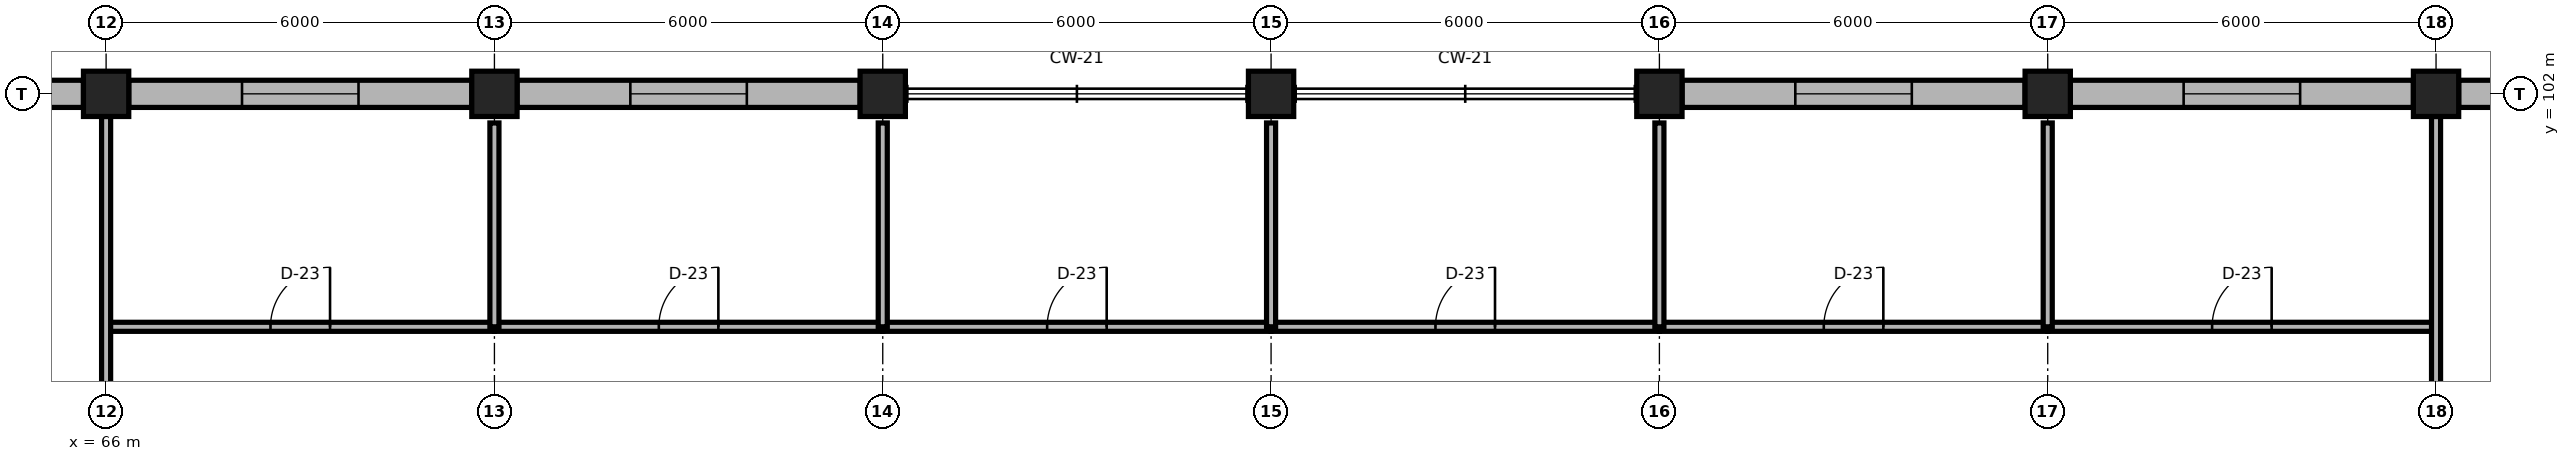
"""IFC4 building model, lengths in metres.
Left out: names, types, materials, properties, quantities, classifications, styles, units other than length and angle.
Written with IfcOpenShell. Run it as: python <this file> out.ifc"""

import sys

from ifc_helpers import new_model, si_unit, direction, frame, frame_2d, origin, origin_2d, place, context, subcontext, project, spatial, rectangle, extrude, element, fill, save


model = new_model("IFC4")
c1 = context("Model", 3, precision=1e-05, world=origin(), true_north=direction((0.0, 1.0)))
c2 = subcontext(c1, "Body", "Model", "MODEL_VIEW")
j1 = project(units=[si_unit("LENGTHUNIT", "METRE"), si_unit("PLANEANGLEUNIT", "RADIAN")], contexts=[c1])
p1 = place(None, origin())
s1 = spatial("IfcSite", under=j1, at=p1, CompositionType="ELEMENT")
p2 = place(p1, origin())
s2 = spatial("IfcBuilding", under=s1, at=p2, CompositionType="ELEMENT")
p3 = place(p2, frame((0.0, 0.0, 60.0)))
s3 = spatial("IfcBuildingStorey", under=s2, at=p3, CompositionType="ELEMENT", Elevation=60.0)
for number, where, z_axis, x_axis in (
    (1, (66.0, 102.0, 0.0), (0.0, 0.0, 1.0), (1.0, 0.0, 0.0)),
    (2, (72.0, 102.0, 0.0), (0.0, 0.0, 1.0), (1.0, 0.0, 0.0)),
    (3, (78.0, 102.0, 0.0), (0.0, 0.0, 1.0), (1.0, 0.0, 0.0)),
    (4, (84.0, 102.0, 0.0), (0.0, 0.0, 1.0), (1.0, 0.0, 0.0)),
    (5, (90.0, 102.0, 0.0), (0.0, 0.0, 1.0), (1.0, 0.0, 0.0)),
    (6, (96.0, 102.0, 0.0), (0.0, 0.0, 1.0), (1.0, 0.0, 0.0)),
    (7, (102.0, 102.0, 0.0), (0.0, 0.0, 1.0), (1.0, 0.0, 0.0)),
):
    element("IfcColumn", number, at=place(p3, frame(where, z_axis=z_axis, x_axis=x_axis)), inside=s3, PredefinedType="COLUMN", context=c2, shape_type="SweptSolid", body=[
        extrude(rectangle(XDim=0.7, YDim=0.7, at=origin_2d()), origin(), (0.0, 0.0, 1.0), 3.9),
    ])
p4 = place(p3, frame((60.35, 102.0, 0.0), z_axis=(0.0, 0.0, 1.0), x_axis=(1.0, 0.0, 0.0)))
e8 = element("IfcWall", 8, at=p4, inside=s3, PredefinedType="SOLIDWALL", context=c2, shape_type="SweptSolid", body=[
    extrude(rectangle(XDim=5.3, YDim=0.42, at=frame_2d((2.65, 0.0))), origin(), (0.0, 0.0, 1.0), 3.32),
])
p5 = place(p4, frame((1.75, 0.0, 0.85)))
e9 = element("IfcOpeningElement", 9, at=p5, cuts=e8, PredefinedType="OPENING", context=c2, shape_type="SweptSolid", body=[
    extrude(rectangle(XDim=1.8, YDim=1.95, at=frame_2d((0.9, 0.975))), frame((0.0, 0.225, 0.0), z_axis=(0.0, -1.0, 0.0), x_axis=(1.0, 0.0, 0.0)), (0.0, 0.0, 1.0), 0.45),
])
p6 = place(p3, frame((66.35, 102.0, 0.0), z_axis=(0.0, 0.0, 1.0), x_axis=(1.0, 0.0, 0.0)))
e10 = element("IfcWall", 10, at=p6, inside=s3, PredefinedType="SOLIDWALL", context=c2, shape_type="SweptSolid", body=[
    extrude(rectangle(XDim=5.3, YDim=0.42, at=frame_2d((2.65, 0.0))), origin(), (0.0, 0.0, 1.0), 3.32),
])
p7 = place(p6, frame((1.75, 0.0, 0.85)))
e11 = element("IfcOpeningElement", 11, at=p7, cuts=e10, PredefinedType="OPENING", context=c2, shape_type="SweptSolid", body=[
    extrude(rectangle(XDim=1.8, YDim=1.95, at=frame_2d((0.9, 0.975))), frame((0.0, 0.225, 0.0), z_axis=(0.0, -1.0, 0.0), x_axis=(1.0, 0.0, 0.0)), (0.0, 0.0, 1.0), 0.45),
])
p8 = place(p3, frame((72.35, 102.0, 0.0), z_axis=(0.0, 0.0, 1.0), x_axis=(1.0, 0.0, 0.0)))
e12 = element("IfcWall", 12, at=p8, inside=s3, PredefinedType="SOLIDWALL", context=c2, shape_type="SweptSolid", body=[
    extrude(rectangle(XDim=5.3, YDim=0.42, at=frame_2d((2.65, 0.0))), origin(), (0.0, 0.0, 1.0), 3.32),
])
p9 = place(p8, frame((1.75, 0.0, 0.85)))
e13 = element("IfcOpeningElement", 13, at=p9, cuts=e12, PredefinedType="OPENING", context=c2, shape_type="SweptSolid", body=[
    extrude(rectangle(XDim=1.8, YDim=1.95, at=frame_2d((0.9, 0.975))), frame((0.0, 0.225, 0.0), z_axis=(0.0, -1.0, 0.0), x_axis=(1.0, 0.0, 0.0)), (0.0, 0.0, 1.0), 0.45),
])
p10 = place(p3, frame((90.35, 102.0, 0.0), z_axis=(0.0, 0.0, 1.0), x_axis=(1.0, 0.0, 0.0)))
e14 = element("IfcWall", 14, at=p10, inside=s3, PredefinedType="SOLIDWALL", context=c2, shape_type="SweptSolid", body=[
    extrude(rectangle(XDim=5.3, YDim=0.42, at=frame_2d((2.65, 0.0))), origin(), (0.0, 0.0, 1.0), 3.32),
])
p11 = place(p10, frame((1.75, 0.0, 0.85)))
e15 = element("IfcOpeningElement", 15, at=p11, cuts=e14, PredefinedType="OPENING", context=c2, shape_type="SweptSolid", body=[
    extrude(rectangle(XDim=1.8, YDim=1.95, at=frame_2d((0.9, 0.975))), frame((0.0, 0.225, 0.0), z_axis=(0.0, -1.0, 0.0), x_axis=(1.0, 0.0, 0.0)), (0.0, 0.0, 1.0), 0.45),
])
p12 = place(p3, frame((96.35, 102.0, 0.0), z_axis=(0.0, 0.0, 1.0), x_axis=(1.0, 0.0, 0.0)))
e16 = element("IfcWall", 16, at=p12, inside=s3, PredefinedType="SOLIDWALL", context=c2, shape_type="SweptSolid", body=[
    extrude(rectangle(XDim=5.3, YDim=0.42, at=frame_2d((2.65, 0.0))), origin(), (0.0, 0.0, 1.0), 3.32),
])
p13 = place(p12, frame((1.75, 0.0, 0.85)))
e17 = element("IfcOpeningElement", 17, at=p13, cuts=e16, PredefinedType="OPENING", context=c2, shape_type="SweptSolid", body=[
    extrude(rectangle(XDim=1.8, YDim=1.95, at=frame_2d((0.9, 0.975))), frame((0.0, 0.225, 0.0), z_axis=(0.0, -1.0, 0.0), x_axis=(1.0, 0.0, 0.0)), (0.0, 0.0, 1.0), 0.45),
])
p14 = place(p3, frame((102.35, 102.0, 0.0), z_axis=(0.0, 0.0, 1.0), x_axis=(1.0, 0.0, 0.0)))
e18 = element("IfcWall", 18, at=p14, inside=s3, PredefinedType="SOLIDWALL", context=c2, shape_type="SweptSolid", body=[
    extrude(rectangle(XDim=5.3, YDim=0.42, at=frame_2d((2.65, 0.0))), origin(), (0.0, 0.0, 1.0), 3.32),
])
p15 = place(p14, frame((1.75, 0.0, 0.85)))
e19 = element("IfcOpeningElement", 19, at=p15, cuts=e18, PredefinedType="OPENING", context=c2, shape_type="SweptSolid", body=[
    extrude(rectangle(XDim=1.8, YDim=1.95, at=frame_2d((0.9, 0.975))), frame((0.0, 0.225, 0.0), z_axis=(0.0, -1.0, 0.0), x_axis=(1.0, 0.0, 0.0)), (0.0, 0.0, 1.0), 0.45),
])
p16 = place(p3, frame((66.0, 98.4, 0.0), z_axis=(0.0, 0.0, 1.0), x_axis=(1.0, 0.0, 0.0)))
e20 = element("IfcWall", 20, at=p16, inside=s3, PredefinedType="PARTITIONING", context=c2, shape_type="SweptSolid", body=[
    extrude(rectangle(XDim=6.0, YDim=0.14, at=frame_2d((3.0, 0.0))), origin(), (0.0, 0.0, 1.0), 3.74),
])
p17 = place(p16, frame((2.54, 0.0, 0.0)))
e21 = element("IfcOpeningElement", 21, at=p17, cuts=e20, PredefinedType="OPENING", context=c2, shape_type="SweptSolid", body=[
    extrude(rectangle(XDim=0.92, YDim=2.15, at=frame_2d((0.46, 1.075))), frame((0.0, 0.085, 0.0), z_axis=(0.0, -1.0, 0.0), x_axis=(1.0, 0.0, 0.0)), (0.0, 0.0, 1.0), 0.17),
])
p18 = place(p3, frame((72.0, 98.4, 0.0), z_axis=(0.0, 0.0, 1.0), x_axis=(1.0, 0.0, 0.0)))
e22 = element("IfcWall", 22, at=p18, inside=s3, PredefinedType="PARTITIONING", context=c2, shape_type="SweptSolid", body=[
    extrude(rectangle(XDim=6.0, YDim=0.14, at=frame_2d((3.0, 0.0))), origin(), (0.0, 0.0, 1.0), 3.74),
])
p19 = place(p18, frame((2.54, 0.0, 0.0)))
e23 = element("IfcOpeningElement", 23, at=p19, cuts=e22, PredefinedType="OPENING", context=c2, shape_type="SweptSolid", body=[
    extrude(rectangle(XDim=0.92, YDim=2.15, at=frame_2d((0.46, 1.075))), frame((0.0, 0.085, 0.0), z_axis=(0.0, -1.0, 0.0), x_axis=(1.0, 0.0, 0.0)), (0.0, 0.0, 1.0), 0.17),
])
p20 = place(p3, frame((78.0, 98.4, 0.0), z_axis=(0.0, 0.0, 1.0), x_axis=(1.0, 0.0, 0.0)))
e24 = element("IfcWall", 24, at=p20, inside=s3, PredefinedType="PARTITIONING", context=c2, shape_type="SweptSolid", body=[
    extrude(rectangle(XDim=6.0, YDim=0.14, at=frame_2d((3.0, 0.0))), origin(), (0.0, 0.0, 1.0), 3.74),
])
p21 = place(p20, frame((2.54, 0.0, 0.0)))
e25 = element("IfcOpeningElement", 25, at=p21, cuts=e24, PredefinedType="OPENING", context=c2, shape_type="SweptSolid", body=[
    extrude(rectangle(XDim=0.92, YDim=2.15, at=frame_2d((0.46, 1.075))), frame((0.0, 0.085, 0.0), z_axis=(0.0, -1.0, 0.0), x_axis=(1.0, 0.0, 0.0)), (0.0, 0.0, 1.0), 0.17),
])
p22 = place(p3, frame((84.0, 98.4, 0.0), z_axis=(0.0, 0.0, 1.0), x_axis=(1.0, 0.0, 0.0)))
e26 = element("IfcWall", 26, at=p22, inside=s3, PredefinedType="PARTITIONING", context=c2, shape_type="SweptSolid", body=[
    extrude(rectangle(XDim=6.0, YDim=0.14, at=frame_2d((3.0, 0.0))), origin(), (0.0, 0.0, 1.0), 3.74),
])
p23 = place(p22, frame((2.54, 0.0, 0.0)))
e27 = element("IfcOpeningElement", 27, at=p23, cuts=e26, PredefinedType="OPENING", context=c2, shape_type="SweptSolid", body=[
    extrude(rectangle(XDim=0.92, YDim=2.15, at=frame_2d((0.46, 1.075))), frame((0.0, 0.085, 0.0), z_axis=(0.0, -1.0, 0.0), x_axis=(1.0, 0.0, 0.0)), (0.0, 0.0, 1.0), 0.17),
])
p24 = place(p3, frame((90.0, 98.4, 0.0), z_axis=(0.0, 0.0, 1.0), x_axis=(1.0, 0.0, 0.0)))
e28 = element("IfcWall", 28, at=p24, inside=s3, PredefinedType="PARTITIONING", context=c2, shape_type="SweptSolid", body=[
    extrude(rectangle(XDim=6.0, YDim=0.14, at=frame_2d((3.0, 0.0))), origin(), (0.0, 0.0, 1.0), 3.74),
])
p25 = place(p24, frame((2.54, 0.0, 0.0)))
e29 = element("IfcOpeningElement", 29, at=p25, cuts=e28, PredefinedType="OPENING", context=c2, shape_type="SweptSolid", body=[
    extrude(rectangle(XDim=0.92, YDim=2.15, at=frame_2d((0.46, 1.075))), frame((0.0, 0.085, 0.0), z_axis=(0.0, -1.0, 0.0), x_axis=(1.0, 0.0, 0.0)), (0.0, 0.0, 1.0), 0.17),
])
p26 = place(p3, frame((96.0, 98.4, 0.0), z_axis=(0.0, 0.0, 1.0), x_axis=(1.0, 0.0, 0.0)))
e30 = element("IfcWall", 30, at=p26, inside=s3, PredefinedType="PARTITIONING", context=c2, shape_type="SweptSolid", body=[
    extrude(rectangle(XDim=6.0, YDim=0.14, at=frame_2d((3.0, 0.0))), origin(), (0.0, 0.0, 1.0), 3.74),
])
p27 = place(p26, frame((2.54, 0.0, 0.0)))
e31 = element("IfcOpeningElement", 31, at=p27, cuts=e30, PredefinedType="OPENING", context=c2, shape_type="SweptSolid", body=[
    extrude(rectangle(XDim=0.92, YDim=2.15, at=frame_2d((0.46, 1.075))), frame((0.0, 0.085, 0.0), z_axis=(0.0, -1.0, 0.0), x_axis=(1.0, 0.0, 0.0)), (0.0, 0.0, 1.0), 0.17),
])
for number, where, z_axis, x_axis in (
    (32, (72.0, 98.4, 0.0), (0.0, 0.0, 1.0), (0.0, 1.0, 0.0)),
    (33, (78.0, 98.4, 0.0), (0.0, 0.0, 1.0), (0.0, 1.0, 0.0)),
    (34, (84.0, 98.4, 0.0), (0.0, 0.0, 1.0), (0.0, 1.0, 0.0)),
    (35, (90.0, 98.4, 0.0), (0.0, 0.0, 1.0), (0.0, 1.0, 0.0)),
    (36, (96.0, 98.4, 0.0), (0.0, 0.0, 1.0), (0.0, 1.0, 0.0)),
):
    element("IfcWall", number, at=place(p3, frame(where, z_axis=z_axis, x_axis=x_axis)), inside=s3, PredefinedType="PARTITIONING", context=c2, shape_type="SweptSolid", body=[
        extrude(rectangle(XDim=3.15, YDim=0.14, at=frame_2d((1.575, 0.0))), origin(), (0.0, 0.0, 1.0), 3.449),
    ])
for number, where, z_axis, x_axis in (
    (37, (66.0, 96.35, 0.0), (0.0, 0.0, 1.0), (0.0, 1.0, 0.0)),
    (38, (102.0, 96.35, 0.0), (0.0, 0.0, 1.0), (0.0, 1.0, 0.0)),
):
    element("IfcWall", number, at=place(p3, frame(where, z_axis=z_axis, x_axis=x_axis)), inside=s3, PredefinedType="PARTITIONING", context=c2, shape_type="SweptSolid", body=[
        extrude(rectangle(XDim=5.3, YDim=0.14, at=frame_2d((2.65, 0.0))), origin(), (0.0, 0.0, 1.0), 3.449),
    ])
p28 = place(p7, origin())
e39 = element("IfcWindow", 39, at=p28, inside=s3, PartitioningType="SINGLE_PANEL", PredefinedType="WINDOW", context=c2, shape_type="SweptSolid", body=[
    extrude(rectangle(XDim=1.8, YDim=1.95, at=frame_2d((0.9, 0.975))), frame((0.0, 0.03, 0.0), z_axis=(0.0, -1.0, 0.0), x_axis=(1.0, 0.0, 0.0)), (0.0, 0.0, 1.0), 0.06),
])
fill(e11, e39)
p29 = place(p9, origin())
e40 = element("IfcWindow", 40, at=p29, inside=s3, PartitioningType="SINGLE_PANEL", PredefinedType="WINDOW", context=c2, shape_type="SweptSolid", body=[
    extrude(rectangle(XDim=1.8, YDim=1.95, at=frame_2d((0.9, 0.975))), frame((0.0, 0.03, 0.0), z_axis=(0.0, -1.0, 0.0), x_axis=(1.0, 0.0, 0.0)), (0.0, 0.0, 1.0), 0.06),
])
fill(e13, e40)
p30 = place(p11, origin())
e41 = element("IfcWindow", 41, at=p30, inside=s3, PartitioningType="SINGLE_PANEL", PredefinedType="WINDOW", context=c2, shape_type="SweptSolid", body=[
    extrude(rectangle(XDim=1.8, YDim=1.95, at=frame_2d((0.9, 0.975))), frame((0.0, 0.03, 0.0), z_axis=(0.0, -1.0, 0.0), x_axis=(1.0, 0.0, 0.0)), (0.0, 0.0, 1.0), 0.06),
])
fill(e15, e41)
p31 = place(p13, origin())
e42 = element("IfcWindow", 42, at=p31, inside=s3, PartitioningType="SINGLE_PANEL", PredefinedType="WINDOW", context=c2, shape_type="SweptSolid", body=[
    extrude(rectangle(XDim=1.8, YDim=1.95, at=frame_2d((0.9, 0.975))), frame((0.0, 0.03, 0.0), z_axis=(0.0, -1.0, 0.0), x_axis=(1.0, 0.0, 0.0)), (0.0, 0.0, 1.0), 0.06),
])
fill(e17, e42)
p32 = place(p17, origin())
e43 = element("IfcDoor", 43, at=p32, inside=s3, OperationType="SINGLE_SWING_RIGHT", PredefinedType="DOOR", context=c2, shape_type="SweptSolid", body=[
    extrude(rectangle(XDim=0.92, YDim=2.15, at=frame_2d((0.46, 1.075))), frame((0.0, 0.025, 0.0), z_axis=(0.0, -1.0, 0.0), x_axis=(1.0, 0.0, 0.0)), (0.0, 0.0, 1.0), 0.05),
])
fill(e21, e43)
p33 = place(p19, origin())
e44 = element("IfcDoor", 44, at=p33, inside=s3, OperationType="SINGLE_SWING_RIGHT", PredefinedType="DOOR", context=c2, shape_type="SweptSolid", body=[
    extrude(rectangle(XDim=0.92, YDim=2.15, at=frame_2d((0.46, 1.075))), frame((0.0, 0.025, 0.0), z_axis=(0.0, -1.0, 0.0), x_axis=(1.0, 0.0, 0.0)), (0.0, 0.0, 1.0), 0.05),
])
fill(e23, e44)
p34 = place(p21, origin())
e45 = element("IfcDoor", 45, at=p34, inside=s3, OperationType="SINGLE_SWING_RIGHT", PredefinedType="DOOR", context=c2, shape_type="SweptSolid", body=[
    extrude(rectangle(XDim=0.92, YDim=2.15, at=frame_2d((0.46, 1.075))), frame((0.0, 0.025, 0.0), z_axis=(0.0, -1.0, 0.0), x_axis=(1.0, 0.0, 0.0)), (0.0, 0.0, 1.0), 0.05),
])
fill(e25, e45)
p35 = place(p23, origin())
e46 = element("IfcDoor", 46, at=p35, inside=s3, OperationType="SINGLE_SWING_RIGHT", PredefinedType="DOOR", context=c2, shape_type="SweptSolid", body=[
    extrude(rectangle(XDim=0.92, YDim=2.15, at=frame_2d((0.46, 1.075))), frame((0.0, 0.025, 0.0), z_axis=(0.0, -1.0, 0.0), x_axis=(1.0, 0.0, 0.0)), (0.0, 0.0, 1.0), 0.05),
])
fill(e27, e46)
p36 = place(p25, origin())
e47 = element("IfcDoor", 47, at=p36, inside=s3, OperationType="SINGLE_SWING_RIGHT", PredefinedType="DOOR", context=c2, shape_type="SweptSolid", body=[
    extrude(rectangle(XDim=0.92, YDim=2.15, at=frame_2d((0.46, 1.075))), frame((0.0, 0.025, 0.0), z_axis=(0.0, -1.0, 0.0), x_axis=(1.0, 0.0, 0.0)), (0.0, 0.0, 1.0), 0.05),
])
fill(e29, e47)
p37 = place(p27, origin())
e48 = element("IfcDoor", 48, at=p37, inside=s3, OperationType="SINGLE_SWING_RIGHT", PredefinedType="DOOR", context=c2, shape_type="SweptSolid", body=[
    extrude(rectangle(XDim=0.92, YDim=2.15, at=frame_2d((0.46, 1.075))), frame((0.0, 0.025, 0.0), z_axis=(0.0, -1.0, 0.0), x_axis=(1.0, 0.0, 0.0)), (0.0, 0.0, 1.0), 0.05),
])
fill(e31, e48)
save(model, sys.argv[1])
